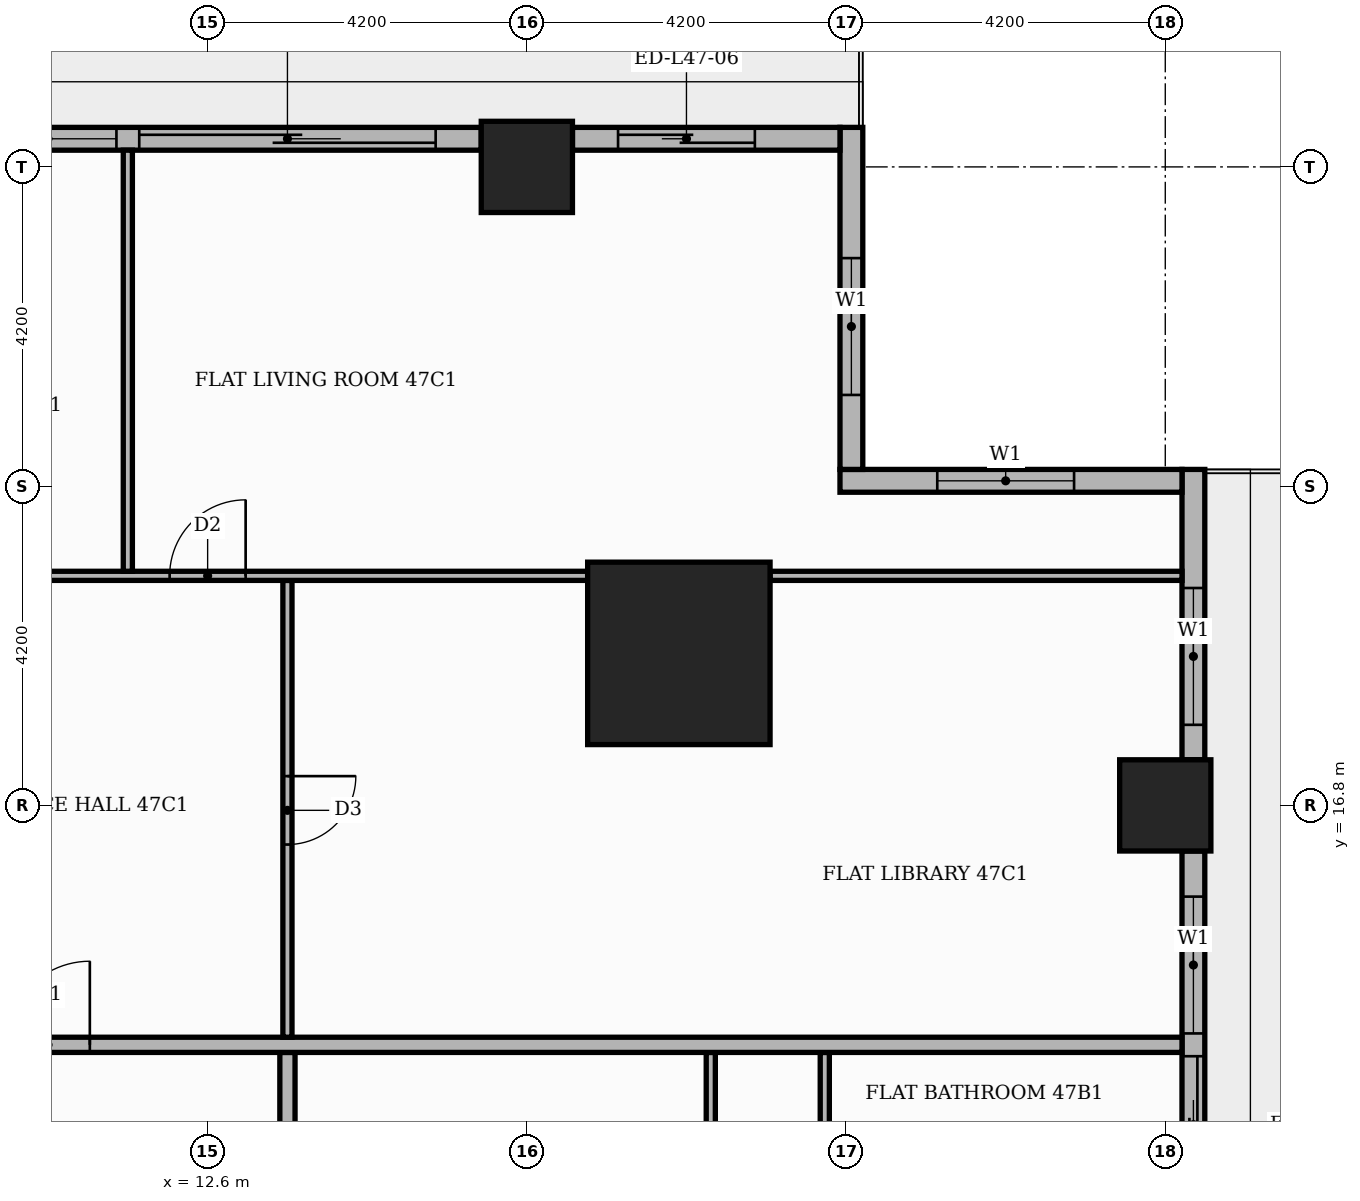
"""IFC4 building model, lengths in metres.
Left out: names, types, materials, properties, quantities, classifications, styles, units other than length and angle.
Written with IfcOpenShell. Run it as: python <this file> out.ifc"""

import sys

from ifc_helpers import new_model, si_unit, direction, frame, frame_2d, origin, origin_2d, place, context, subcontext, project, spatial, rectangle, extrude, element, fill, save


model = new_model("IFC4")
c1 = context("Model", 3, precision=1e-05, world=origin(), true_north=direction((0.0, 1.0)))
c2 = subcontext(c1, "Body", "Model", "MODEL_VIEW")
j1 = project(units=[si_unit("LENGTHUNIT", "METRE"), si_unit("PLANEANGLEUNIT", "RADIAN")], contexts=[c1])
p1 = place(None, origin())
s1 = spatial("IfcSite", under=j1, at=p1, CompositionType="ELEMENT")
p2 = place(p1, origin())
s2 = spatial("IfcBuilding", under=s1, at=p2, CompositionType="ELEMENT")
p3 = place(p2, frame((0.0, 0.0, 200.1)))
s3 = spatial("IfcBuildingStorey", under=s2, at=p3, CompositionType="ELEMENT", Elevation=200.1)
p4 = place(p3, frame((18.8, 18.8, 0.0), z_axis=(0.0, 0.0, 1.0), x_axis=(1.0, 0.0, 0.0)))
e1 = element("IfcColumn", 1, at=p4, inside=s3, PredefinedType="COLUMN", context=c2, shape_type="SweptSolid", body=[
    extrude(rectangle(XDim=2.4, YDim=2.4, at=origin_2d()), origin(), (0.0, 0.0, 1.0), 3.9),
])
for number, where, z_axis, x_axis in (
    (2, (25.2, 16.8, 0.0), (0.0, 0.0, 1.0), (1.0, 0.0, 0.0)),
    (3, (16.8, 25.2, 0.0), (0.0, 0.0, 1.0), (1.0, 0.0, 0.0)),
):
    element("IfcColumn", number, at=place(p3, frame(where, z_axis=z_axis, x_axis=x_axis)), inside=s3, PredefinedType="COLUMN", context=c2, shape_type="SweptSolid", body=[
        extrude(rectangle(XDim=1.2, YDim=1.2, at=origin_2d()), origin(), (0.0, 0.0, 1.0), 3.9),
    ])
p5 = place(p3, frame((25.57, 9.0, 0.0), z_axis=(0.0, 0.0, 1.0), x_axis=(0.0, 1.0, 0.0)))
e4 = element("IfcWall", 4, at=p5, inside=s3, PredefinedType="STANDARD", context=c2, shape_type="SweptSolid", body=[
    extrude(rectangle(XDim=7.2, YDim=0.3, at=frame_2d((3.6, 0.0))), origin(), (0.0, 0.0, 1.0), 3.48),
])
p6 = place(p5, frame((0.6, 0.0, 0.9)))
e5 = element("IfcOpeningElement", 5, at=p6, cuts=e4, PredefinedType="OPENING", context=c2, shape_type="SweptSolid", body=[
    extrude(rectangle(XDim=1.8, YDim=2.1, at=frame_2d((0.9, 1.05))), frame((0.0, 0.16, 0.0), z_axis=(0.0, -1.0, 0.0), x_axis=(1.0, 0.0, 0.0)), (0.0, 0.0, 1.0), 0.32),
])
p7 = place(p5, frame((2.7, 0.0, 0.0)))
e6 = element("IfcOpeningElement", 6, at=p7, cuts=e4, PredefinedType="OPENING", context=c2, shape_type="SweptSolid", body=[
    extrude(rectangle(XDim=1.8, YDim=2.4, at=frame_2d((0.9, 1.2))), frame((0.0, 0.16, 0.0), z_axis=(0.0, -1.0, 0.0), x_axis=(1.0, 0.0, 0.0)), (0.0, 0.0, 1.0), 0.32),
])
p8 = place(p5, frame((4.8, 0.0, 0.9)))
e7 = element("IfcOpeningElement", 7, at=p8, cuts=e4, PredefinedType="OPENING", context=c2, shape_type="SweptSolid", body=[
    extrude(rectangle(XDim=1.8, YDim=2.1, at=frame_2d((0.9, 1.05))), frame((0.0, 0.16, 0.0), z_axis=(0.0, -1.0, 0.0), x_axis=(1.0, 0.0, 0.0)), (0.0, 0.0, 1.0), 0.32),
])
p9 = place(p3, frame((25.57, 17.4, 0.0), z_axis=(0.0, 0.0, 1.0), x_axis=(0.0, 1.0, 0.0)))
e8 = element("IfcWall", 8, at=p9, inside=s3, PredefinedType="STANDARD", context=c2, shape_type="SweptSolid", body=[
    extrude(rectangle(XDim=3.82, YDim=0.3, at=frame_2d((1.91, 0.0))), origin(), (0.0, 0.0, 1.0), 3.48),
])
p10 = place(p9, frame((0.46, 0.0, 0.9)))
e9 = element("IfcOpeningElement", 9, at=p10, cuts=e8, PredefinedType="OPENING", context=c2, shape_type="SweptSolid", body=[
    extrude(rectangle(XDim=1.8, YDim=2.1, at=frame_2d((0.9, 1.05))), frame((0.0, 0.16, 0.0), z_axis=(0.0, -1.0, 0.0), x_axis=(1.0, 0.0, 0.0)), (0.0, 0.0, 1.0), 0.32),
])
p11 = place(p3, frame((25.42, 21.07, 0.0), z_axis=(0.0, 0.0, 1.0), x_axis=(-1.0, 0.0, 0.0)))
e10 = element("IfcWall", 10, at=p11, inside=s3, PredefinedType="STANDARD", context=c2, shape_type="SweptSolid", body=[
    extrude(rectangle(XDim=4.5, YDim=0.3, at=frame_2d((2.25, 0.0))), origin(), (0.0, 0.0, 1.0), 3.48),
])
p12 = place(p11, frame((1.42, 0.0, 0.9)))
e11 = element("IfcOpeningElement", 11, at=p12, cuts=e10, PredefinedType="OPENING", context=c2, shape_type="SweptSolid", body=[
    extrude(rectangle(XDim=1.8, YDim=2.1, at=frame_2d((0.9, 1.05))), frame((0.0, 0.16, 0.0), z_axis=(0.0, -1.0, 0.0), x_axis=(1.0, 0.0, 0.0)), (0.0, 0.0, 1.0), 0.32),
])
p13 = place(p3, frame((21.07, 21.22, 0.0), z_axis=(0.0, 0.0, 1.0), x_axis=(0.0, 1.0, 0.0)))
e12 = element("IfcWall", 12, at=p13, inside=s3, PredefinedType="STANDARD", context=c2, shape_type="SweptSolid", body=[
    extrude(rectangle(XDim=4.5, YDim=0.3, at=frame_2d((2.25, 0.0))), origin(), (0.0, 0.0, 1.0), 3.48),
])
p14 = place(p13, frame((0.98, 0.0, 0.9)))
e13 = element("IfcOpeningElement", 13, at=p14, cuts=e12, PredefinedType="OPENING", context=c2, shape_type="SweptSolid", body=[
    extrude(rectangle(XDim=1.8, YDim=2.1, at=frame_2d((0.9, 1.05))), frame((0.0, 0.16, 0.0), z_axis=(0.0, -1.0, 0.0), x_axis=(1.0, 0.0, 0.0)), (0.0, 0.0, 1.0), 0.32),
])
p15 = place(p3, frame((20.92, 25.57, 0.0), z_axis=(0.0, 0.0, 1.0), x_axis=(-1.0, 0.0, 0.0)))
e14 = element("IfcWall", 14, at=p15, inside=s3, PredefinedType="STANDARD", context=c2, shape_type="SweptSolid", body=[
    extrude(rectangle(XDim=3.52, YDim=0.3, at=frame_2d((1.76, 0.0))), origin(), (0.0, 0.0, 1.0), 3.48),
])
p16 = place(p15, frame((1.12, 0.0, 0.0)))
e15 = element("IfcOpeningElement", 15, at=p16, cuts=e14, PredefinedType="OPENING", context=c2, shape_type="SweptSolid", body=[
    extrude(rectangle(XDim=1.8, YDim=2.4, at=frame_2d((0.9, 1.2))), frame((0.0, 0.16, 0.0), z_axis=(0.0, -1.0, 0.0), x_axis=(1.0, 0.0, 0.0)), (0.0, 0.0, 1.0), 0.32),
])
p17 = place(p3, frame((16.2, 25.57, 0.0), z_axis=(0.0, 0.0, 1.0), x_axis=(-1.0, 0.0, 0.0)))
e16 = element("IfcWall", 16, at=p17, inside=s3, PredefinedType="STANDARD", context=c2, shape_type="SweptSolid", body=[
    extrude(rectangle(XDim=7.2, YDim=0.3, at=frame_2d((3.6, 0.0))), origin(), (0.0, 0.0, 1.0), 3.48),
])
p18 = place(p17, frame((0.6, 0.0, 0.0)))
e17 = element("IfcOpeningElement", 17, at=p18, cuts=e16, PredefinedType="OPENING", context=c2, shape_type="SweptSolid", body=[
    extrude(rectangle(XDim=3.9, YDim=2.4, at=frame_2d((1.95, 1.2))), frame((0.0, 0.16, 0.0), z_axis=(0.0, -1.0, 0.0), x_axis=(1.0, 0.0, 0.0)), (0.0, 0.0, 1.0), 0.32),
])
p19 = place(p17, frame((4.8, 0.0, 0.9)))
e18 = element("IfcOpeningElement", 18, at=p19, cuts=e16, PredefinedType="OPENING", context=c2, shape_type="SweptSolid", body=[
    extrude(rectangle(XDim=1.8, YDim=2.1, at=frame_2d((0.9, 1.05))), frame((0.0, 0.16, 0.0), z_axis=(0.0, -1.0, 0.0), x_axis=(1.0, 0.0, 0.0)), (0.0, 0.0, 1.0), 0.32),
])
p20 = place(p3, frame((19.22, 9.51, 0.0), z_axis=(0.0, 0.0, 1.0), x_axis=(0.0, 1.0, 0.0)))
e19 = element("IfcWall", 19, at=p20, inside=s3, PredefinedType="PARTITIONING", context=c2, shape_type="SweptSolid", body=[
    extrude(rectangle(XDim=4.04, YDim=0.12, at=frame_2d((2.02, 0.0))), origin(), (0.0, 0.0, 1.0), 3.48),
])
p21 = place(p20, frame((1.59, 0.0, 0.0)))
e20 = element("IfcOpeningElement", 20, at=p21, cuts=e19, PredefinedType="OPENING", context=c2, shape_type="SweptSolid", body=[
    extrude(rectangle(XDim=0.9, YDim=2.1, at=frame_2d((0.45, 1.05))), frame((0.0, 0.07, 0.0), z_axis=(0.0, -1.0, 0.0), x_axis=(1.0, 0.0, 0.0)), (0.0, 0.0, 1.0), 0.14),
])
p22 = place(p3, frame((13.65, 11.1, 0.0), z_axis=(0.0, 0.0, 1.0), x_axis=(0.0, 1.0, 0.0)))
e21 = element("IfcWall", 21, at=p22, inside=s3, PredefinedType="PARTITIONING", context=c2, shape_type="SweptSolid", body=[
    extrude(rectangle(XDim=2.45, YDim=0.2, at=frame_2d((1.225, 0.0))), origin(), (0.0, 0.0, 1.0), 3.48),
])
p23 = place(p3, frame((20.72, 11.61, 0.0), z_axis=(0.0, 0.0, 1.0), x_axis=(0.0, 1.0, 0.0)))
e22 = element("IfcWall", 22, at=p23, inside=s3, PredefinedType="PARTITIONING", context=c2, shape_type="SweptSolid", body=[
    extrude(rectangle(XDim=1.94, YDim=0.12, at=frame_2d((0.97, 0.0))), origin(), (0.0, 0.0, 1.0), 3.48),
])
p24 = place(p3, frame((-13.65, 13.65, 0.0), z_axis=(0.0, 0.0, 1.0), x_axis=(1.0, 0.0, 0.0)))
e23 = element("IfcWall", 23, at=p24, inside=s3, PredefinedType="PARTITIONING", context=c2, shape_type="SweptSolid", body=[
    extrude(rectangle(XDim=39.07, YDim=0.2, at=frame_2d((19.535, 0.0))), origin(), (0.0, 0.0, 1.0), 3.48),
])
p25 = place(p24, frame((23.6, 0.0, 0.0)))
e24 = element("IfcOpeningElement", 24, at=p25, cuts=e23, PredefinedType="OPENING", context=c2, shape_type="SweptSolid", body=[
    extrude(rectangle(XDim=1.1, YDim=2.4, at=frame_2d((0.55, 1.2))), frame((0.0, 0.11, 0.0), z_axis=(0.0, -1.0, 0.0), x_axis=(1.0, 0.0, 0.0)), (0.0, 0.0, 1.0), 0.22),
])
p26 = place(p3, frame((13.65, 13.75, 0.0), z_axis=(0.0, 0.0, 1.0), x_axis=(0.0, 1.0, 0.0)))
e25 = element("IfcWall", 25, at=p26, inside=s3, PredefinedType="PARTITIONING", context=c2, shape_type="SweptSolid", body=[
    extrude(rectangle(XDim=6.01, YDim=0.12, at=frame_2d((3.005, 0.0))), origin(), (0.0, 0.0, 1.0), 3.48),
])
p27 = place(p26, frame((2.535, 0.0, 0.0)))
e26 = element("IfcOpeningElement", 26, at=p27, cuts=e25, PredefinedType="OPENING", context=c2, shape_type="SweptSolid", body=[
    extrude(rectangle(XDim=0.9, YDim=2.1, at=frame_2d((0.45, 1.05))), frame((0.0, 0.07, 0.0), z_axis=(0.0, -1.0, 0.0), x_axis=(1.0, 0.0, 0.0)), (0.0, 0.0, 1.0), 0.14),
])
p28 = place(p3, frame((-13.55, 19.82, 0.0), z_axis=(0.0, 0.0, 1.0), x_axis=(1.0, 0.0, 0.0)))
e27 = element("IfcWall", 27, at=p28, inside=s3, PredefinedType="PARTITIONING", context=c2, shape_type="SweptSolid", body=[
    extrude(rectangle(XDim=31.15, YDim=0.12, at=frame_2d((15.575, 0.0))), origin(), (0.0, 0.0, 1.0), 3.48),
])
p29 = place(p28, frame((25.65, 0.0, 0.0)))
e28 = element("IfcOpeningElement", 28, at=p29, cuts=e27, PredefinedType="OPENING", context=c2, shape_type="SweptSolid", body=[
    extrude(rectangle(XDim=1.0, YDim=2.1, at=frame_2d((0.5, 1.05))), frame((0.0, 0.07, 0.0), z_axis=(0.0, -1.0, 0.0), x_axis=(1.0, 0.0, 0.0)), (0.0, 0.0, 1.0), 0.14),
])
p30 = place(p28, frame((22.55, 0.0, 0.0)))
e29 = element("IfcOpeningElement", 29, at=p30, cuts=e27, PredefinedType="OPENING", context=c2, shape_type="SweptSolid", body=[
    extrude(rectangle(XDim=0.9, YDim=2.1, at=frame_2d((0.45, 1.05))), frame((0.0, 0.07, 0.0), z_axis=(0.0, -1.0, 0.0), x_axis=(1.0, 0.0, 0.0)), (0.0, 0.0, 1.0), 0.14),
])
p31 = place(p28, frame((18.35, 0.0, 0.0)))
e30 = element("IfcOpeningElement", 30, at=p31, cuts=e27, PredefinedType="OPENING", context=c2, shape_type="SweptSolid", body=[
    extrude(rectangle(XDim=0.9, YDim=2.1, at=frame_2d((0.45, 1.05))), frame((0.0, 0.07, 0.0), z_axis=(0.0, -1.0, 0.0), x_axis=(1.0, 0.0, 0.0)), (0.0, 0.0, 1.0), 0.14),
])
p32 = place(p28, frame((9.95, 0.0, 0.0)))
e31 = element("IfcOpeningElement", 31, at=p32, cuts=e27, PredefinedType="OPENING", context=c2, shape_type="SweptSolid", body=[
    extrude(rectangle(XDim=0.9, YDim=2.1, at=frame_2d((0.45, 1.05))), frame((0.0, 0.07, 0.0), z_axis=(0.0, -1.0, 0.0), x_axis=(1.0, 0.0, 0.0)), (0.0, 0.0, 1.0), 0.14),
])
p33 = place(p28, frame((3.65, 0.0, 0.0)))
e32 = element("IfcOpeningElement", 32, at=p33, cuts=e27, PredefinedType="OPENING", context=c2, shape_type="SweptSolid", body=[
    extrude(rectangle(XDim=0.9, YDim=2.1, at=frame_2d((0.45, 1.05))), frame((0.0, 0.07, 0.0), z_axis=(0.0, -1.0, 0.0), x_axis=(1.0, 0.0, 0.0)), (0.0, 0.0, 1.0), 0.14),
])
p34 = place(p3, frame((20.0, 19.82, 0.0), z_axis=(0.0, 0.0, 1.0), x_axis=(1.0, 0.0, 0.0)))
e33 = element("IfcWall", 33, at=p34, inside=s3, PredefinedType="PARTITIONING", context=c2, shape_type="SweptSolid", body=[
    extrude(rectangle(XDim=5.42, YDim=0.12, at=frame_2d((2.71, 0.0))), origin(), (0.0, 0.0, 1.0), 3.48),
])
p35 = place(p3, frame((11.55, 19.88, 0.0), z_axis=(0.0, 0.0, 1.0), x_axis=(0.0, 1.0, 0.0)))
e34 = element("IfcWall", 34, at=p35, inside=s3, PredefinedType="PARTITIONING", context=c2, shape_type="SweptSolid", body=[
    extrude(rectangle(XDim=5.54, YDim=0.12, at=frame_2d((2.77, 0.0))), origin(), (0.0, 0.0, 1.0), 3.48),
])
p36 = place(p7, origin())
e35 = element("IfcDoor", 35, at=p36, inside=s3, OperationType="SLIDING_TO_RIGHT", PredefinedType="DOOR", context=c2, shape_type="SweptSolid", body=[
    extrude(rectangle(XDim=1.8, YDim=2.4, at=frame_2d((0.9, 1.2))), frame((0.0, 0.025, 0.0), z_axis=(0.0, -1.0, 0.0), x_axis=(1.0, 0.0, 0.0)), (0.0, 0.0, 1.0), 0.05),
])
fill(e6, e35)
p37 = place(p8, origin())
e36 = element("IfcWindow", 36, at=p37, inside=s3, PartitioningType="SINGLE_PANEL", PredefinedType="WINDOW", context=c2, shape_type="SweptSolid", body=[
    extrude(rectangle(XDim=1.8, YDim=2.1, at=frame_2d((0.9, 1.05))), frame((0.0, 0.03, 0.0), z_axis=(0.0, -1.0, 0.0), x_axis=(1.0, 0.0, 0.0)), (0.0, 0.0, 1.0), 0.06),
])
fill(e7, e36)
p38 = place(p10, origin())
e37 = element("IfcWindow", 37, at=p38, inside=s3, PartitioningType="SINGLE_PANEL", PredefinedType="WINDOW", context=c2, shape_type="SweptSolid", body=[
    extrude(rectangle(XDim=1.8, YDim=2.1, at=frame_2d((0.9, 1.05))), frame((0.0, 0.03, 0.0), z_axis=(0.0, -1.0, 0.0), x_axis=(1.0, 0.0, 0.0)), (0.0, 0.0, 1.0), 0.06),
])
fill(e9, e37)
p39 = place(p12, origin())
e38 = element("IfcWindow", 38, at=p39, inside=s3, PartitioningType="SINGLE_PANEL", PredefinedType="WINDOW", context=c2, shape_type="SweptSolid", body=[
    extrude(rectangle(XDim=1.8, YDim=2.1, at=frame_2d((0.9, 1.05))), frame((0.0, 0.03, 0.0), z_axis=(0.0, -1.0, 0.0), x_axis=(1.0, 0.0, 0.0)), (0.0, 0.0, 1.0), 0.06),
])
fill(e11, e38)
p40 = place(p14, origin())
e39 = element("IfcWindow", 39, at=p40, inside=s3, PartitioningType="SINGLE_PANEL", PredefinedType="WINDOW", context=c2, shape_type="SweptSolid", body=[
    extrude(rectangle(XDim=1.8, YDim=2.1, at=frame_2d((0.9, 1.05))), frame((0.0, 0.03, 0.0), z_axis=(0.0, -1.0, 0.0), x_axis=(1.0, 0.0, 0.0)), (0.0, 0.0, 1.0), 0.06),
])
fill(e13, e39)
p41 = place(p16, origin())
e40 = element("IfcDoor", 40, at=p41, inside=s3, OperationType="SLIDING_TO_RIGHT", PredefinedType="DOOR", context=c2, shape_type="SweptSolid", body=[
    extrude(rectangle(XDim=1.8, YDim=2.4, at=frame_2d((0.9, 1.2))), frame((0.0, 0.025, 0.0), z_axis=(0.0, -1.0, 0.0), x_axis=(1.0, 0.0, 0.0)), (0.0, 0.0, 1.0), 0.05),
])
fill(e15, e40)
p42 = place(p18, origin())
e41 = element("IfcDoor", 41, at=p42, inside=s3, OperationType="SLIDING_TO_LEFT", PredefinedType="DOOR", context=c2, shape_type="SweptSolid", body=[
    extrude(rectangle(XDim=3.9, YDim=2.4, at=frame_2d((1.95, 1.2))), frame((0.0, 0.025, 0.0), z_axis=(0.0, -1.0, 0.0), x_axis=(1.0, 0.0, 0.0)), (0.0, 0.0, 1.0), 0.05),
])
fill(e17, e41)
p43 = place(p19, origin())
e42 = element("IfcWindow", 42, at=p43, inside=s3, PartitioningType="SINGLE_PANEL", PredefinedType="WINDOW", context=c2, shape_type="SweptSolid", body=[
    extrude(rectangle(XDim=1.8, YDim=2.1, at=frame_2d((0.9, 1.05))), frame((0.0, 0.03, 0.0), z_axis=(0.0, -1.0, 0.0), x_axis=(1.0, 0.0, 0.0)), (0.0, 0.0, 1.0), 0.06),
])
fill(e18, e42)
p44 = place(p25, origin())
e43 = element("IfcDoor", 43, at=p44, inside=s3, OperationType="SINGLE_SWING_RIGHT", PredefinedType="DOOR", context=c2, shape_type="SweptSolid", body=[
    extrude(rectangle(XDim=1.1, YDim=2.4, at=frame_2d((0.55, 1.2))), frame((0.0, 0.025, 0.0), z_axis=(0.0, -1.0, 0.0), x_axis=(1.0, 0.0, 0.0)), (0.0, 0.0, 1.0), 0.05),
])
fill(e24, e43)
p45 = place(p27, frame((0.9, 0.0, 0.0), z_axis=(0.0, 0.0, 1.0), x_axis=(-1.0, 0.0, 0.0)))
e44 = element("IfcDoor", 44, at=p45, inside=s3, OperationType="SINGLE_SWING_RIGHT", PredefinedType="DOOR", context=c2, shape_type="SweptSolid", body=[
    extrude(rectangle(XDim=0.9, YDim=2.1, at=frame_2d((0.45, 1.05))), frame((0.0, 0.025, 0.0), z_axis=(0.0, -1.0, 0.0), x_axis=(1.0, 0.0, 0.0)), (0.0, 0.0, 1.0), 0.05),
])
fill(e26, e44)
p46 = place(p29, origin())
e45 = element("IfcDoor", 45, at=p46, inside=s3, OperationType="SINGLE_SWING_RIGHT", PredefinedType="DOOR", context=c2, shape_type="SweptSolid", body=[
    extrude(rectangle(XDim=1.0, YDim=2.1, at=frame_2d((0.5, 1.05))), frame((0.0, 0.025, 0.0), z_axis=(0.0, -1.0, 0.0), x_axis=(1.0, 0.0, 0.0)), (0.0, 0.0, 1.0), 0.05),
])
fill(e28, e45)
save(model, sys.argv[1])
